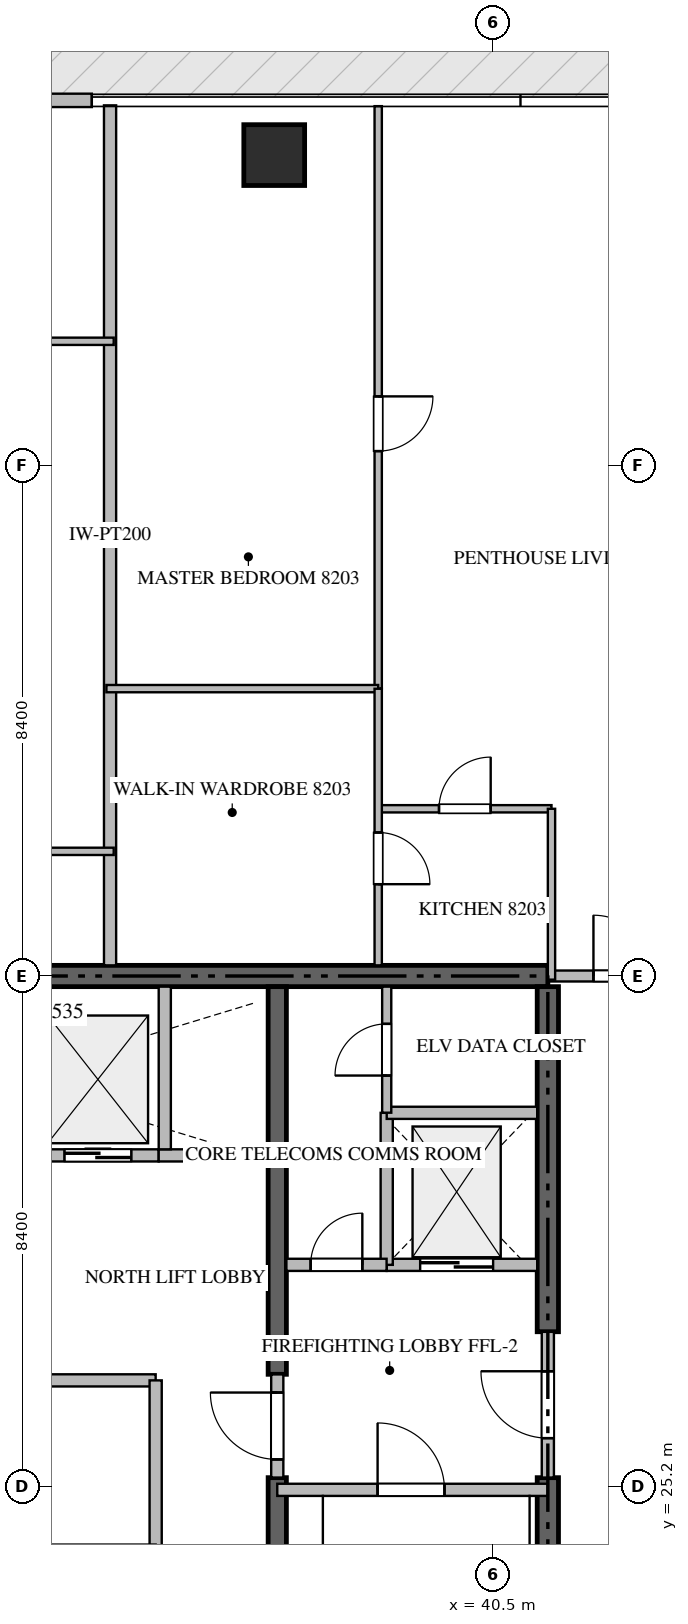
"""IFC4 building model, lengths in metres.
Left out: names, types, materials, properties, quantities, classifications, styles, units other than length and angle.
Written with IfcOpenShell. Run it as: python <this file> out.ifc"""

import sys

from ifc_helpers import new_model, si_unit, direction, frame, frame_2d, origin, origin_2d, place, context, subcontext, project, spatial, rectangle, extrude, source, transform, mapped, element, fill, save


model = new_model("IFC4")
c1 = context("Model", 3, precision=1e-05, world=origin(), true_north=direction((0.0, 1.0)))
c2 = subcontext(c1, "Body", "Model", "MODEL_VIEW")
j1 = project(units=[si_unit("LENGTHUNIT", "METRE"), si_unit("PLANEANGLEUNIT", "RADIAN")], contexts=[c1])
p1 = place(None, origin())
s1 = spatial("IfcSite", under=j1, at=p1, CompositionType="ELEMENT")
p2 = place(p1, origin())
s2 = spatial("IfcBuilding", under=s1, at=p2, CompositionType="ELEMENT")
p3 = place(p2, frame((0.0, 0.0, 329.9)))
s3 = spatial("IfcBuildingStorey", under=s2, at=p3, CompositionType="ELEMENT", Elevation=329.9)
p4 = place(p3, frame((41.4, 33.6, -0.26), z_axis=(0.0, 0.0, 1.0), x_axis=(-1.0, 0.0, 0.0)))
e1 = element("IfcWall", 1, at=p4, inside=s3, PredefinedType="SHEAR", context=c2, shape_type="SweptSolid", body=[
    extrude(rectangle(XDim=18.0, YDim=0.35, at=frame_2d((9.0, 0.0))), origin(), (0.0, 0.0, 1.0), 4.048),
])
p5 = place(p3, frame((41.4, 16.975, -0.26), z_axis=(0.0, 0.0, 1.0), x_axis=(0.0, 1.0, 0.0)))
e2 = element("IfcWall", 2, at=p5, inside=s3, PredefinedType="SHEAR", context=c2, shape_type="SweptSolid", body=[
    extrude(rectangle(XDim=8.375, YDim=0.35, at=frame_2d((4.188, 0.0))), origin(), (0.0, 0.0, 1.0), 4.048),
])
p6 = place(p3, frame((41.4, 27.75, -0.26), z_axis=(0.0, 0.0, 1.0), x_axis=(0.0, 1.0, 0.0)))
e3 = element("IfcWall", 3, at=p6, inside=s3, PredefinedType="SHEAR", context=c2, shape_type="SweptSolid", body=[
    extrude(rectangle(XDim=5.675, YDim=0.35, at=frame_2d((2.837, 0.0))), origin(), (0.0, 0.0, 1.0), 4.048),
])
p7 = place(p3, frame((36.95, 16.975, -0.26), z_axis=(0.0, 0.0, 1.0), x_axis=(0.0, 1.0, 0.0)))
e4 = element("IfcWall", 4, at=p7, inside=s3, PredefinedType="SHEAR", context=c2, shape_type="SweptSolid", body=[
    extrude(rectangle(XDim=8.375, YDim=0.3, at=frame_2d((4.188, 0.0))), origin(), (0.0, 0.0, 1.0), 4.048),
])
p8 = place(p3, frame((36.95, 27.05, -0.26), z_axis=(0.0, 0.0, 1.0), x_axis=(0.0, 1.0, 0.0)))
e5 = element("IfcWall", 5, at=p8, inside=s3, PredefinedType="SHEAR", context=c2, shape_type="SweptSolid", body=[
    extrude(rectangle(XDim=6.375, YDim=0.3, at=frame_2d((3.188, 0.0))), origin(), (0.0, 0.0, 1.0), 4.048),
])
m1 = source(origin(), c2, "Body", "SweptSolid", [
    extrude(rectangle(XDim=1.0, YDim=1.0, at=origin_2d()), origin(), (0.0, 0.0, 1.0), 4.05),
])
p9 = place(p3, frame((36.9, 47.1, -0.26), z_axis=(0.0, 0.0, 1.0), x_axis=(1.0, 0.0, 0.0)))
e6 = element("IfcColumn", 6, at=p9, inside=s3, PredefinedType="COLUMN", context=c2, shape_type="MappedRepresentation", body=[
    mapped(m1, transform((0.0, 0.0, 0.0), scale=1.0)),
])
p10 = place(p3, frame((33.9, 48.0, 0.0), z_axis=(0.0, 0.0, 1.0), x_axis=(-1.0, 0.0, 0.0)))
e7 = element("IfcWall", 7, at=p10, inside=s3, PredefinedType="ELEMENTEDWALL", context=c2, shape_type="SweptSolid", body=[
    extrude(rectangle(XDim=3.0, YDim=0.22, at=frame_2d((1.5, 0.0))), origin(), (0.0, 0.0, 1.0), 3.775),
])
p11 = place(p10, frame((0.95, 0.0, 0.0)))
e8 = element("IfcOpeningElement", 8, at=p11, cuts=e7, PredefinedType="OPENING", context=c2, shape_type="SweptSolid", body=[
    extrude(rectangle(XDim=1.1, YDim=2.2, at=frame_2d((0.55, 1.1))), frame((0.0, 0.12, 0.0), z_axis=(0.0, -1.0, 0.0), x_axis=(1.0, 0.0, 0.0)), (0.0, 0.0, 1.0), 0.24),
])
p12 = place(p3, frame((36.95, 25.15, 0.0), z_axis=(0.0, 0.0, 1.0), x_axis=(1.0, 0.0, 0.0)))
e9 = element("IfcWall", 9, at=p12, inside=s3, PredefinedType="STANDARD", context=c2, shape_type="SweptSolid", body=[
    extrude(rectangle(XDim=4.45, YDim=0.2, at=frame_2d((2.225, 0.0))), origin(), (0.0, 0.0, 1.0), 3.79),
])
p13 = place(p12, frame((1.65, 0.0, 0.0)))
e10 = element("IfcOpeningElement", 10, at=p13, cuts=e9, PredefinedType="OPENING", context=c2, shape_type="SweptSolid", body=[
    extrude(rectangle(XDim=1.1, YDim=2.15, at=frame_2d((0.55, 1.075))), frame((0.0, 0.11, 0.0), z_axis=(0.0, -1.0, 0.0), x_axis=(1.0, 0.0, 0.0)), (0.0, 0.0, 1.0), 0.22),
])
p14 = place(p3, frame((38.75, 28.85, 0.0), z_axis=(0.0, 0.0, 1.0), x_axis=(1.0, 0.0, 0.0)))
e11 = element("IfcWall", 11, at=p14, inside=s3, PredefinedType="STANDARD", context=c2, shape_type="SweptSolid", body=[
    extrude(rectangle(XDim=2.475, YDim=0.2, at=frame_2d((1.238, 0.0))), origin(), (0.0, 0.0, 1.0), 3.79),
])
p15 = place(p14, frame((0.55, 0.0, 0.0)))
e12 = element("IfcOpeningElement", 12, at=p15, cuts=e11, PredefinedType="OPENING", context=c2, shape_type="SweptSolid", body=[
    extrude(rectangle(XDim=1.2, YDim=2.2, at=frame_2d((0.6, 1.1))), frame((0.0, 0.11, 0.0), z_axis=(0.0, -1.0, 0.0), x_axis=(1.0, 0.0, 0.0)), (0.0, 0.0, 1.0), 0.22),
])
p16 = place(p3, frame((32.85, 30.65, 0.0), z_axis=(0.0, 0.0, 1.0), x_axis=(1.0, 0.0, 0.0)))
e13 = element("IfcWall", 13, at=p16, inside=s3, PredefinedType="STANDARD", context=c2, shape_type="SweptSolid", body=[
    extrude(rectangle(XDim=2.15, YDim=0.2, at=frame_2d((1.075, 0.0))), origin(), (0.0, 0.0, 1.0), 3.79),
])
p17 = place(p16, frame((0.6, 0.0, 0.0)))
e14 = element("IfcOpeningElement", 14, at=p17, cuts=e13, PredefinedType="OPENING", context=c2, shape_type="SweptSolid", body=[
    extrude(rectangle(XDim=1.1, YDim=2.2, at=frame_2d((0.55, 1.1))), frame((0.0, 0.11, 0.0), z_axis=(0.0, -1.0, 0.0), x_axis=(1.0, 0.0, 0.0)), (0.0, 0.0, 1.0), 0.22),
])
p18 = place(p3, frame((35.0, 30.65, 0.0), z_axis=(0.0, 0.0, 1.0), x_axis=(1.0, 0.0, 0.0)))
e15 = element("IfcWall", 15, at=p18, inside=s3, PredefinedType="STANDARD", context=c2, shape_type="SweptSolid", body=[
    extrude(rectangle(XDim=1.8, YDim=0.2, at=frame_2d((0.9, 0.0))), origin(), (0.0, 0.0, 1.0), 3.79),
])
p19 = place(p3, frame((35.1, 30.75, 0.0), z_axis=(0.0, 0.0, 1.0), x_axis=(0.0, 1.0, 0.0)))
e16 = element("IfcWall", 16, at=p19, inside=s3, PredefinedType="STANDARD", context=c2, shape_type="SweptSolid", body=[
    extrude(rectangle(XDim=2.675, YDim=0.2, at=frame_2d((1.337, 0.0))), origin(), (0.0, 0.0, 1.0), 3.79),
])
p20 = place(p3, frame((38.75, 28.85, 0.0), z_axis=(0.0, 0.0, 1.0), x_axis=(0.0, 1.0, 0.0)))
e17 = element("IfcWall", 17, at=p20, inside=s3, PredefinedType="STANDARD", context=c2, shape_type="SweptSolid", body=[
    extrude(rectangle(XDim=2.5, YDim=0.2, at=frame_2d((1.25, 0.0))), origin(), (0.0, 0.0, 1.0), 3.79),
])
p21 = place(p3, frame((38.75, 31.35, 0.0), z_axis=(0.0, 0.0, 1.0), x_axis=(1.0, 0.0, 0.0)))
e18 = element("IfcWall", 18, at=p21, inside=s3, PredefinedType="STANDARD", context=c2, shape_type="SweptSolid", body=[
    extrude(rectangle(XDim=2.475, YDim=0.2, at=frame_2d((1.238, 0.0))), origin(), (0.0, 0.0, 1.0), 3.79),
])
p22 = place(p3, frame((37.1, 28.85, 0.0), z_axis=(0.0, 0.0, 1.0), x_axis=(1.0, 0.0, 0.0)))
e19 = element("IfcWall", 19, at=p22, inside=s3, PredefinedType="STANDARD", context=c2, shape_type="SweptSolid", body=[
    extrude(rectangle(XDim=1.648, YDim=0.2, at=frame_2d((0.824, 0.0))), origin(), (0.0, 0.0, 1.0), 3.79),
])
p23 = place(p22, frame((0.399, 0.0, 0.0)))
e20 = element("IfcOpeningElement", 20, at=p23, cuts=e19, PredefinedType="OPENING", context=c2, shape_type="SweptSolid", body=[
    extrude(rectangle(XDim=0.85, YDim=2.1, at=frame_2d((0.425, 1.05))), frame((0.0, 0.11, 0.0), z_axis=(0.0, -1.0, 0.0), x_axis=(1.0, 0.0, 0.0)), (0.0, 0.0, 1.0), 0.22),
])
p24 = place(p3, frame((41.4, 25.352, 0.0), z_axis=(0.0, 0.0, 1.0), x_axis=(0.0, 1.0, 0.0)))
e21 = element("IfcWall", 21, at=p24, inside=s3, PredefinedType="STANDARD", context=c2, shape_type="SweptSolid", body=[
    extrude(rectangle(XDim=2.396, YDim=0.2, at=frame_2d((1.198, 0.0))), origin(), (0.0, 0.0, 1.0), 3.79),
])
p25 = place(p24, frame((0.648, 0.0, 0.0)))
e22 = element("IfcOpeningElement", 22, at=p25, cuts=e21, PredefinedType="OPENING", context=c2, shape_type="SweptSolid", body=[
    extrude(rectangle(XDim=1.1, YDim=2.15, at=frame_2d((0.55, 1.075))), frame((0.0, 0.11, 0.0), z_axis=(0.0, -1.0, 0.0), x_axis=(1.0, 0.0, 0.0)), (0.0, 0.0, 1.0), 0.22),
])
p26 = place(p3, frame((36.95, 25.352, 0.0), z_axis=(0.0, 0.0, 1.0), x_axis=(0.0, 1.0, 0.0)))
e23 = element("IfcWall", 23, at=p26, inside=s3, PredefinedType="STANDARD", context=c2, shape_type="SweptSolid", body=[
    extrude(rectangle(XDim=1.696, YDim=0.2, at=frame_2d((0.848, 0.0))), origin(), (0.0, 0.0, 1.0), 3.79),
])
p27 = place(p26, frame((0.298, 0.0, 0.0)))
e24 = element("IfcOpeningElement", 24, at=p27, cuts=e23, PredefinedType="OPENING", context=c2, shape_type="SweptSolid", body=[
    extrude(rectangle(XDim=1.1, YDim=2.15, at=frame_2d((0.55, 1.075))), frame((0.0, 0.11, 0.0), z_axis=(0.0, -1.0, 0.0), x_axis=(1.0, 0.0, 0.0)), (0.0, 0.0, 1.0), 0.22),
])
p28 = place(p3, frame((38.75, 31.352, 0.0), z_axis=(0.0, 0.0, 1.0), x_axis=(0.0, 1.0, 0.0)))
e25 = element("IfcWall", 25, at=p28, inside=s3, PredefinedType="PARTITIONING", context=c2, shape_type="SweptSolid", body=[
    extrude(rectangle(XDim=2.073, YDim=0.15, at=frame_2d((1.037, 0.0))), origin(), (0.0, 0.0, 1.0), 3.79),
])
p29 = place(p28, frame((0.611, 0.0, 0.0)))
e26 = element("IfcOpeningElement", 26, at=p29, cuts=e25, PredefinedType="OPENING", context=c2, shape_type="SweptSolid", body=[
    extrude(rectangle(XDim=0.85, YDim=2.1, at=frame_2d((0.425, 1.05))), frame((0.0, 0.085, 0.0), z_axis=(0.0, -1.0, 0.0), x_axis=(1.0, 0.0, 0.0)), (0.0, 0.0, 1.0), 0.17),
])
p30 = place(p3, frame((28.0, 26.95, 0.0), z_axis=(0.0, 0.0, 1.0), x_axis=(1.0, 0.0, 0.0)))
e27 = element("IfcWall", 27, at=p30, inside=s3, PredefinedType="STANDARD", context=c2, shape_type="SweptSolid", body=[
    extrude(rectangle(XDim=6.95, YDim=0.2, at=frame_2d((3.475, 0.0))), origin(), (0.0, 0.0, 1.0), 3.79),
])
p31 = place(p3, frame((34.95, 24.15, 0.0), z_axis=(0.0, 0.0, 1.0), x_axis=(0.0, 1.0, 0.0)))
e28 = element("IfcWall", 28, at=p31, inside=s3, PredefinedType="STANDARD", context=c2, shape_type="SweptSolid", body=[
    extrude(rectangle(XDim=2.8, YDim=0.2, at=frame_2d((1.4, 0.0))), origin(), (0.0, 0.0, 1.0), 3.79),
])
p32 = place(p3, frame((34.2, 33.775, 0.0), z_axis=(0.0, 0.0, 1.0), x_axis=(0.0, 1.0, 0.0)))
e29 = element("IfcWall", 29, at=p32, inside=s3, PredefinedType="PARTITIONING", context=c2, shape_type="SweptSolid", body=[
    extrude(rectangle(XDim=14.143, YDim=0.2, at=frame_2d((7.072, 0.0))), origin(), (0.0, 0.0, 1.0), 3.79),
])
p33 = place(p3, frame((41.402, 33.6, 0.0), z_axis=(0.0, 0.0, 1.0), x_axis=(1.0, 0.0, 0.0)))
e30 = element("IfcWall", 30, at=p33, inside=s3, PredefinedType="PARTITIONING", context=c2, shape_type="SweptSolid", body=[
    extrude(rectangle(XDim=2.496, YDim=0.18, at=frame_2d((1.248, 0.0))), origin(), (0.0, 0.0, 1.0), 3.79),
])
p34 = place(p33, frame((0.748, 0.0, 0.0)))
e31 = element("IfcOpeningElement", 31, at=p34, cuts=e30, PredefinedType="OPENING", context=c2, shape_type="SweptSolid", body=[
    extrude(rectangle(XDim=1.0, YDim=2.15, at=frame_2d((0.5, 1.075))), frame((0.0, 0.1, 0.0), z_axis=(0.0, -1.0, 0.0), x_axis=(1.0, 0.0, 0.0)), (0.0, 0.0, 1.0), 0.2),
])
for number, where, z_axis, x_axis in (
    (32, (26.3, 44.038, 0.0), (0.0, 0.0, 1.0), (1.0, 0.0, 0.0)),
    (33, (26.3, 35.65, 0.0), (0.0, 0.0, 1.0), (1.0, 0.0, 0.0)),
):
    element("IfcWall", number, at=place(p3, frame(where, z_axis=z_axis, x_axis=x_axis)), inside=s3, PredefinedType="PARTITIONING", context=c2, shape_type="SweptSolid", body=[
        extrude(rectangle(XDim=7.96, YDim=0.12, at=frame_2d((3.98, 0.0))), origin(), (0.0, 0.0, 1.0), 3.79),
    ])
p35 = place(p3, frame((38.61, 36.35, 0.0), z_axis=(0.0, 0.0, 1.0), x_axis=(1.0, 0.0, 0.0)))
e34 = element("IfcWall", 34, at=p35, inside=s3, PredefinedType="PARTITIONING", context=c2, shape_type="SweptSolid", body=[
    extrude(rectangle(XDim=2.85, YDim=0.12, at=frame_2d((1.425, 0.0))), origin(), (0.0, 0.0, 1.0), 3.79),
])
p36 = place(p35, frame((1.0, 0.0, 0.0)))
e35 = element("IfcOpeningElement", 35, at=p36, cuts=e34, PredefinedType="OPENING", context=c2, shape_type="SweptSolid", body=[
    extrude(rectangle(XDim=0.85, YDim=2.1, at=frame_2d((0.425, 1.05))), frame((0.0, 0.07, 0.0), z_axis=(0.0, -1.0, 0.0), x_axis=(1.0, 0.0, 0.0)), (0.0, 0.0, 1.0), 0.14),
])
p37 = place(p3, frame((41.46, 36.35, 0.0), z_axis=(0.0, 0.0, 1.0), x_axis=(0.0, -1.0, 0.0)))
e36 = element("IfcWall", 36, at=p37, inside=s3, PredefinedType="PARTITIONING", context=c2, shape_type="SweptSolid", body=[
    extrude(rectangle(XDim=2.81, YDim=0.12, at=frame_2d((1.405, 0.0))), origin(), (0.0, 0.0, 1.0), 3.79),
])
p38 = place(p3, frame((38.61, 47.905, 0.0), z_axis=(0.0, 0.0, 1.0), x_axis=(0.0, -1.0, 0.0)))
e37 = element("IfcWall", 37, at=p38, inside=s3, PredefinedType="PARTITIONING", context=c2, shape_type="SweptSolid", body=[
    extrude(rectangle(XDim=9.579, YDim=0.12, at=frame_2d((4.79, 0.0))), origin(), (0.0, 0.0, 1.0), 3.79),
])
p39 = place(p38, frame((4.773, 0.0, 0.0)))
e38 = element("IfcOpeningElement", 38, at=p39, cuts=e37, PredefinedType="OPENING", context=c2, shape_type="SweptSolid", body=[
    extrude(rectangle(XDim=0.9, YDim=2.1, at=frame_2d((0.45, 1.05))), frame((0.0, 0.07, 0.0), z_axis=(0.0, -1.0, 0.0), x_axis=(1.0, 0.0, 0.0)), (0.0, 0.0, 1.0), 0.14),
])
p40 = place(p3, frame((34.14, 38.326, 0.0), z_axis=(0.0, 0.0, 1.0), x_axis=(1.0, 0.0, 0.0)))
e39 = element("IfcWall", 39, at=p40, inside=s3, PredefinedType="PARTITIONING", context=c2, shape_type="SweptSolid", body=[
    extrude(rectangle(XDim=4.47, YDim=0.12, at=frame_2d((2.235, 0.0))), origin(), (0.0, 0.0, 1.0), 3.79),
])
p41 = place(p3, frame((38.61, 38.324, 0.0), z_axis=(0.0, 0.0, 1.0), x_axis=(0.0, -1.0, 0.0)))
e40 = element("IfcWall", 40, at=p41, inside=s3, PredefinedType="PARTITIONING", context=c2, shape_type="SweptSolid", body=[
    extrude(rectangle(XDim=4.549, YDim=0.12, at=frame_2d((2.274, 0.0))), origin(), (0.0, 0.0, 1.0), 3.79),
])
p42 = place(p41, frame((2.364, 0.0, 0.0)))
e41 = element("IfcOpeningElement", 41, at=p42, cuts=e40, PredefinedType="OPENING", context=c2, shape_type="SweptSolid", body=[
    extrude(rectangle(XDim=0.85, YDim=2.1, at=frame_2d((0.425, 1.05))), frame((0.0, 0.07, 0.0), z_axis=(0.0, -1.0, 0.0), x_axis=(1.0, 0.0, 0.0)), (0.0, 0.0, 1.0), 0.14),
])
m2 = source(origin(), c2, "Body", "SweptSolid", [
    extrude(rectangle(XDim=1.1, YDim=2.15, at=frame_2d((0.55, 1.075))), frame((0.0, 0.025, 0.0), z_axis=(0.0, -1.0, 0.0), x_axis=(1.0, 0.0, 0.0)), (0.0, 0.0, 1.0), 0.05),
])
p43 = place(p13, origin())
e42 = element("IfcDoor", 42, at=p43, inside=s3, OperationType="SINGLE_SWING_LEFT", PredefinedType="DOOR", context=c2, shape_type="MappedRepresentation", body=[
    mapped(m2, transform((0.0, 0.0, 0.0), scale=1.0)),
])
fill(e10, e42)
m3 = source(origin(), c2, "Body", "SweptSolid", [
    extrude(rectangle(XDim=1.2, YDim=2.2, at=frame_2d((0.6, 1.1))), frame((0.0, 0.025, 0.0), z_axis=(0.0, -1.0, 0.0), x_axis=(1.0, 0.0, 0.0)), (0.0, 0.0, 1.0), 0.05),
])
p44 = place(p15, origin())
e43 = element("IfcDoor", 43, at=p44, inside=s3, OperationType="DOUBLE_DOOR_SLIDING", PredefinedType="DOOR", context=c2, shape_type="MappedRepresentation", body=[
    mapped(m3, transform((0.0, 0.0, 0.0), scale=1.0)),
])
fill(e12, e43)
m4 = source(origin(), c2, "Body", "SweptSolid", [
    extrude(rectangle(XDim=1.1, YDim=2.2, at=frame_2d((0.55, 1.1))), frame((0.0, 0.025, 0.0), z_axis=(0.0, -1.0, 0.0), x_axis=(1.0, 0.0, 0.0)), (0.0, 0.0, 1.0), 0.05),
])
p45 = place(p17, origin())
e44 = element("IfcDoor", 44, at=p45, inside=s3, OperationType="DOUBLE_DOOR_SLIDING", PredefinedType="DOOR", context=c2, shape_type="MappedRepresentation", body=[
    mapped(m4, transform((0.0, 0.0, 0.0), scale=1.0)),
])
fill(e14, e44)
m5 = source(origin(), c2, "Body", "SweptSolid", [
    extrude(rectangle(XDim=0.85, YDim=2.1, at=frame_2d((0.425, 1.05))), frame((0.0, 0.025, 0.0), z_axis=(0.0, -1.0, 0.0), x_axis=(1.0, 0.0, 0.0)), (0.0, 0.0, 1.0), 0.05),
])
p46 = place(p23, origin())
e45 = element("IfcDoor", 45, at=p46, inside=s3, OperationType="SINGLE_SWING_RIGHT", PredefinedType="DOOR", context=c2, shape_type="MappedRepresentation", body=[
    mapped(m5, transform((0.0, 0.0, 0.0), scale=1.0)),
])
fill(e20, e45)
p47 = place(p25, origin())
e46 = element("IfcDoor", 46, at=p47, inside=s3, OperationType="SINGLE_SWING_RIGHT", PredefinedType="DOOR", context=c2, shape_type="MappedRepresentation", body=[
    mapped(m2, transform((0.0, 0.0, 0.0), scale=1.0)),
])
fill(e22, e46)
p48 = place(p27, origin())
e47 = element("IfcDoor", 47, at=p48, inside=s3, OperationType="SINGLE_SWING_RIGHT", PredefinedType="DOOR", context=c2, shape_type="MappedRepresentation", body=[
    mapped(m2, transform((0.0, 0.0, 0.0), scale=1.0)),
])
fill(e24, e47)
p49 = place(p29, origin())
e48 = element("IfcDoor", 48, at=p49, inside=s3, OperationType="SINGLE_SWING_LEFT", PredefinedType="DOOR", context=c2, shape_type="MappedRepresentation", body=[
    mapped(m5, transform((0.0, 0.0, 0.0), scale=1.0)),
])
fill(e26, e48)
m6 = source(origin(), c2, "Body", "SweptSolid", [
    extrude(rectangle(XDim=1.0, YDim=2.15, at=frame_2d((0.5, 1.075))), frame((0.0, 0.025, 0.0), z_axis=(0.0, -1.0, 0.0), x_axis=(1.0, 0.0, 0.0)), (0.0, 0.0, 1.0), 0.05),
])
p50 = place(p34, origin())
e49 = element("IfcDoor", 49, at=p50, inside=s3, OperationType="SINGLE_SWING_LEFT", PredefinedType="DOOR", context=c2, shape_type="MappedRepresentation", body=[
    mapped(m6, transform((0.0, 0.0, 0.0), scale=1.0)),
])
fill(e31, e49)
p51 = place(p36, origin())
e50 = element("IfcDoor", 50, at=p51, inside=s3, OperationType="SINGLE_SWING_RIGHT", PredefinedType="DOOR", context=c2, shape_type="MappedRepresentation", body=[
    mapped(m5, transform((0.0, 0.0, 0.0), scale=1.0)),
])
fill(e35, e50)
m7 = source(origin(), c2, "Body", "SweptSolid", [
    extrude(rectangle(XDim=0.9, YDim=2.1, at=frame_2d((0.45, 1.05))), frame((0.0, 0.025, 0.0), z_axis=(0.0, -1.0, 0.0), x_axis=(1.0, 0.0, 0.0)), (0.0, 0.0, 1.0), 0.05),
])
p52 = place(p39, origin())
e51 = element("IfcDoor", 51, at=p52, inside=s3, OperationType="SINGLE_SWING_LEFT", PredefinedType="DOOR", context=c2, shape_type="MappedRepresentation", body=[
    mapped(m7, transform((0.0, 0.0, 0.0), scale=1.0)),
])
fill(e38, e51)
p53 = place(p42, origin())
e52 = element("IfcDoor", 52, at=p53, inside=s3, OperationType="SINGLE_SWING_RIGHT", PredefinedType="DOOR", context=c2, shape_type="MappedRepresentation", body=[
    mapped(m5, transform((0.0, 0.0, 0.0), scale=1.0)),
])
fill(e41, e52)
save(model, sys.argv[1])
